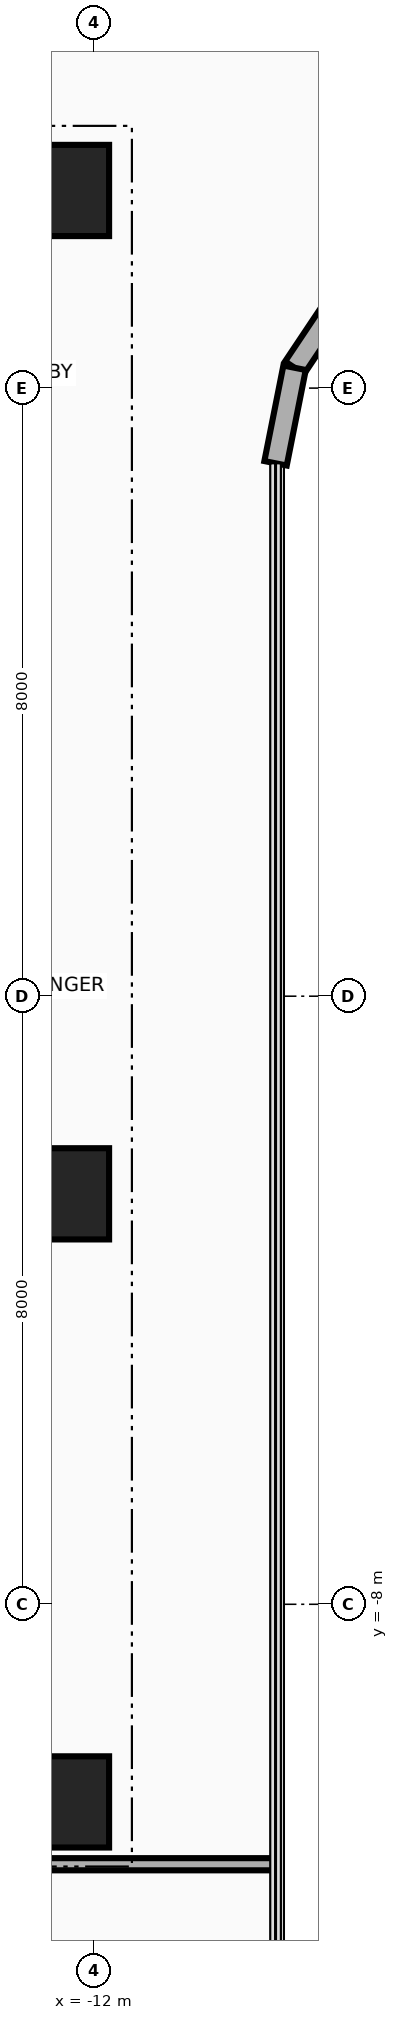
"""IFC4 building model, lengths in metres.
Left out: names, types, materials, properties, quantities, classifications, styles, units other than length and angle.
Written with IfcOpenShell. Run it as: python <this file> out.ifc"""

import sys

from ifc_helpers import new_model, si_unit, direction, frame, frame_2d, origin, origin_2d, place, context, subcontext, project, spatial, rectangle, extrude, source, transform, mapped, element, save


model = new_model("IFC4")
c1 = context("Model", 3, precision=1e-05, world=origin(), true_north=direction((0.0, 1.0)))
c2 = subcontext(c1, "Body", "Model", "MODEL_VIEW")
j1 = project(units=[si_unit("LENGTHUNIT", "METRE"), si_unit("PLANEANGLEUNIT", "RADIAN")], contexts=[c1])
p1 = place(None, origin())
s1 = spatial("IfcSite", under=j1, at=p1, CompositionType="ELEMENT")
p2 = place(p1, origin())
s2 = spatial("IfcBuilding", under=s1, at=p2, CompositionType="ELEMENT")
p3 = place(p2, frame((0.0, 0.0, 150.1)))
s3 = spatial("IfcBuildingStorey", under=s2, at=p3, CompositionType="ELEMENT", Elevation=150.1)
for number, where, z_axis, x_axis in (
    (1, (-22.65, 10.8, 0.0), (0.0, 0.0, 1.0), (1.0, 0.0, 0.0)),
    (2, (-22.65, -10.8, 0.0), (0.0, 0.0, 1.0), (1.0, 0.0, 0.0)),
):
    element("IfcWall", number, at=place(p3, frame(where, z_axis=z_axis, x_axis=x_axis)), inside=s3, PredefinedType="SHEAR", context=c2, shape_type="SweptSolid", body=[
        extrude(rectangle(XDim=10.25, YDim=0.7, at=frame_2d((5.125, 0.0))), origin(), (0.0, 0.0, 1.0), 3.46),
    ])
m1 = source(origin(), c2, "Body", "SweptSolid", [
    extrude(rectangle(XDim=1.2, YDim=1.2, at=origin_2d()), origin(), (0.0, 0.0, 1.0), 3.7),
])
for number, where, z_axis, x_axis in (
    (3, (-12.4, -10.6, 0.0), (0.0, 0.0, 1.0), (1.0, 0.0, 0.0)),
    (4, (-12.4, -2.6, 0.0), (0.0, 0.0, 1.0), (1.0, 0.0, 0.0)),
    (5, (-12.4, 10.6, 0.0), (0.0, 0.0, 1.0), (1.0, 0.0, 0.0)),
):
    element("IfcColumn", number, at=place(p3, frame(where, z_axis=z_axis, x_axis=x_axis)), inside=s3, PredefinedType="COLUMN", context=c2, shape_type="MappedRepresentation", body=[
        mapped(m1, transform((0.0, 0.0, 0.0), x_axis=(1.0, 0.0, 0.0), y_axis=(0.0, 1.0, 0.0), z_axis=(0.0, 0.0, 1.0), scale=1.0)),
    ])
p4 = place(p3, frame((-8.642, 9.342, 0.0), z_axis=(0.0, 0.0, 1.0), x_axis=(-0.555615398575, -0.831439431869, 0.0)))
e6 = element("IfcWall", 6, at=p4, inside=s3, PredefinedType="SOLIDWALL", context=c2, shape_type="SweptSolid", body=[
    extrude(rectangle(XDim=1.292, YDim=0.3, at=frame_2d((0.646, 0.0))), origin(), (0.0, 0.0, 1.0), 3.46),
])
p5 = place(p3, frame((-9.36, 8.268, 0.0), z_axis=(0.0, 0.0, 1.0), x_axis=(-0.195090163074, -0.980785312019, 0.0)))
e7 = element("IfcWall", 7, at=p5, inside=s3, PredefinedType="SOLIDWALL", context=c2, shape_type="SweptSolid", body=[
    extrude(rectangle(XDim=1.281, YDim=0.3, at=frame_2d((0.641, 0.0))), origin(), (0.0, 0.0, 1.0), 3.46),
])
p6 = place(p3, frame((-23.45, -11.42, 0.0), z_axis=(0.0, 0.0, 1.0), x_axis=(1.0, 0.0, 0.0)))
e8 = element("IfcWall", 8, at=p6, inside=s3, PredefinedType="PARTITIONING", context=c2, shape_type="SweptSolid", body=[
    extrude(rectangle(XDim=13.84, YDim=0.16, at=frame_2d((6.92, 0.0))), origin(), (0.0, 0.0, 1.0), 2.834),
])
save(model, sys.argv[1])
